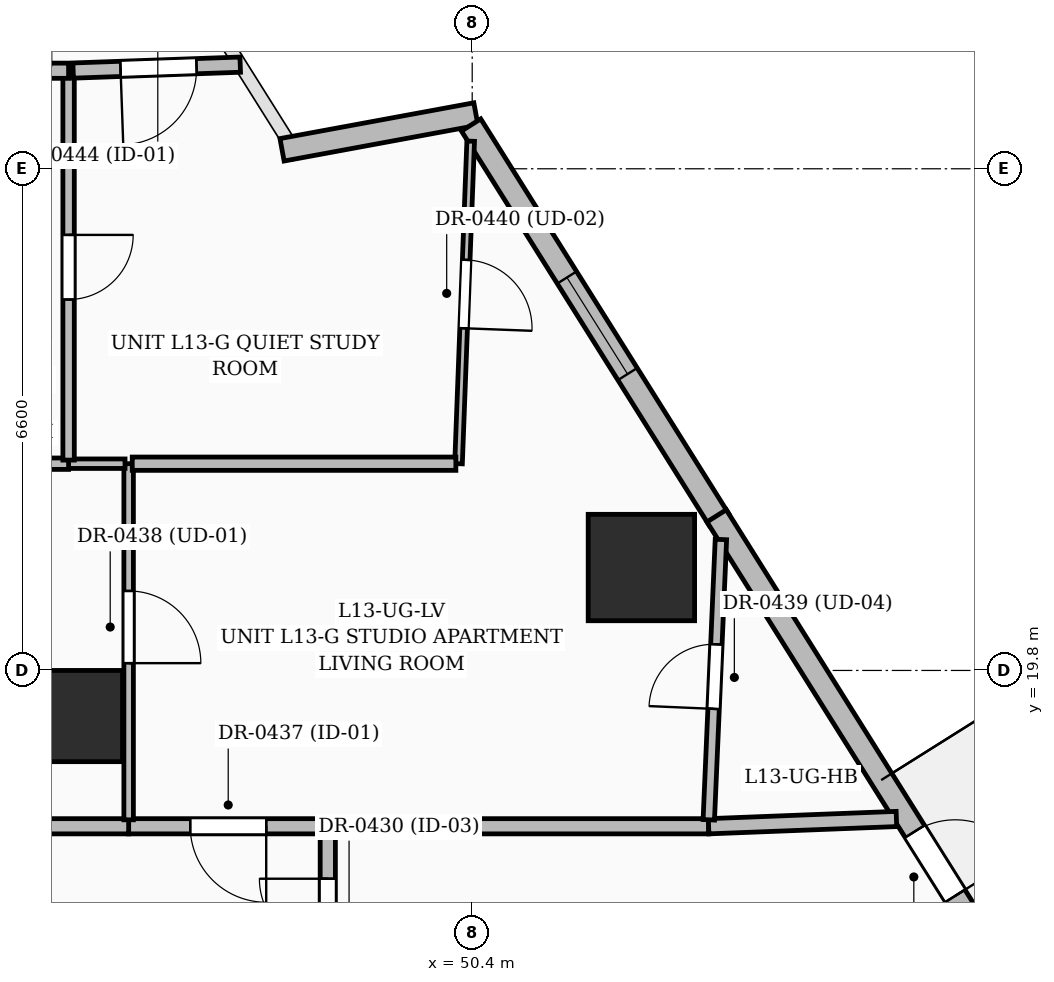
"""IFC4 building model, lengths in metres.
Left out: names, types, materials, properties, quantities, classifications, styles, units other than length and angle.
Written with IfcOpenShell. Run it as: python <this file> out.ifc"""

import sys

from ifc_helpers import new_model, si_unit, direction, frame, frame_2d, origin, origin_2d, place, context, subcontext, project, spatial, rectangle, extrude, element, fill, save


model = new_model("IFC4")
c1 = context("Model", 3, precision=1e-05, world=origin(), true_north=direction((0.0, 1.0)))
c2 = subcontext(c1, "Body", "Model", "MODEL_VIEW")
j1 = project(units=[si_unit("LENGTHUNIT", "METRE"), si_unit("PLANEANGLEUNIT", "RADIAN")], contexts=[c1])
p1 = place(None, origin())
s1 = spatial("IfcSite", under=j1, at=p1, CompositionType="ELEMENT")
p2 = place(p1, origin())
s2 = spatial("IfcBuilding", under=s1, at=p2, CompositionType="ELEMENT")
p3 = place(p2, frame((0.0, 0.0, 57.0)))
s3 = spatial("IfcBuildingStorey", under=s2, at=p3, CompositionType="ELEMENT", Elevation=57.0)
p4 = place(p3, frame((45.2, 19.2, 0.0), z_axis=(0.0, 0.0, 1.0), x_axis=(1.0, 0.0, 0.0)))
e1 = element("IfcColumn", 1, at=p4, inside=s3, PredefinedType="COLUMN", context=c2, shape_type="SweptSolid", body=[
    extrude(rectangle(XDim=1.2, YDim=1.2, at=origin_2d()), origin(), (0.0, 0.0, 1.0), 3.6),
])
p5 = place(p3, frame((52.626, 21.154, 0.0), z_axis=(0.0, 0.0, 1.0), x_axis=(1.0, 0.0, 0.0)))
e2 = element("IfcColumn", 2, at=p5, inside=s3, PredefinedType="COLUMN", context=c2, shape_type="SweptSolid", body=[
    extrude(rectangle(XDim=1.4, YDim=1.4, at=origin_2d()), origin(), (0.0, 0.0, 1.0), 3.6),
])
p6 = place(p3, frame((47.898, 26.65, 0.0), z_axis=(0.0, 0.0, 1.0), x_axis=(0.983393554406, 0.181485859375, 0.0)))
e3 = element("IfcWall", 3, at=p6, inside=s3, PredefinedType="SOLIDWALL", context=c2, shape_type="SweptSolid", body=[
    extrude(rectangle(XDim=2.594, YDim=0.3, at=frame_2d((1.297, 0.0))), origin(), (0.0, 0.0, 1.0), 2.375),
])
p7 = place(p3, frame((50.385, 26.977, 0.0), z_axis=(0.0, 0.0, 1.0), x_axis=(0.531889110823, -0.846814013694, 0.0)))
e4 = element("IfcWall", 4, at=p7, inside=s3, PredefinedType="SOLIDWALL", context=c2, shape_type="SweptSolid", body=[
    extrude(rectangle(XDim=6.126, YDim=0.3, at=frame_2d((3.063, 0.0))), origin(), (0.0, 0.0, 1.0), 3.35),
])
p8 = place(p7, frame((2.37, 0.0, 0.6)))
e5 = element("IfcOpeningElement", 5, at=p8, cuts=e4, PredefinedType="OPENING", context=c2, shape_type="SweptSolid", body=[
    extrude(rectangle(XDim=1.5, YDim=2.1, at=frame_2d((0.75, 1.05))), frame((0.0, 0.16, 0.0), z_axis=(0.0, -1.0, 0.0), x_axis=(1.0, 0.0, 0.0)), (0.0, 0.0, 1.0), 0.32),
])
p9 = place(p3, frame((53.616, 21.834, 0.0), z_axis=(0.0, 0.0, 1.0), x_axis=(0.531897146978, -0.846808966082, 0.0)))
e6 = element("IfcWall", 6, at=p9, inside=s3, PredefinedType="SOLIDWALL", context=c2, shape_type="SweptSolid", body=[
    extrude(rectangle(XDim=6.123, YDim=0.3, at=frame_2d((3.062, 0.0))), origin(), (0.0, 0.0, 1.0), 3.35),
])
p10 = place(p9, frame((4.903, 0.0, 0.0)))
e7 = element("IfcOpeningElement", 7, at=p10, cuts=e6, PredefinedType="OPENING", context=c2, shape_type="SweptSolid", body=[
    extrude(rectangle(XDim=1.0, YDim=2.2, at=frame_2d((0.5, 1.1))), frame((0.0, 0.16, 0.0), z_axis=(0.0, -1.0, 0.0), x_axis=(1.0, 0.0, 0.0)), (0.0, 0.0, 1.0), 0.32),
])
p11 = place(p3, frame((48.5, 15.47, 0.0), z_axis=(0.0, 0.0, 1.0), x_axis=(0.0, 1.0, 0.0)))
e8 = element("IfcWall", 8, at=p11, inside=s3, PredefinedType="PARTITIONING", context=c2, shape_type="SweptSolid", body=[
    extrude(rectangle(XDim=2.28, YDim=0.2, at=frame_2d((1.14, 0.0))), origin(), (0.0, 0.0, 1.0), 2.279),
])
p12 = place(p11, frame((0.69, 0.0, 0.0)))
e9 = element("IfcOpeningElement", 9, at=p12, cuts=e8, PredefinedType="OPENING", context=c2, shape_type="SweptSolid", body=[
    extrude(rectangle(XDim=0.9, YDim=2.1, at=frame_2d((0.45, 1.05))), frame((0.0, 0.11, 0.0), z_axis=(0.0, -1.0, 0.0), x_axis=(1.0, 0.0, 0.0)), (0.0, 0.0, 1.0), 0.22),
])
p13 = place(p3, frame((48.415, 17.75, 0.0), z_axis=(0.0, 0.0, 1.0), x_axis=(-1.0, 0.0, 0.0)))
e10 = element("IfcWall", 10, at=p13, inside=s3, PredefinedType="PARTITIONING", context=c2, shape_type="SweptSolid", body=[
    extrude(rectangle(XDim=2.535, YDim=0.2, at=frame_2d((1.268, 0.0))), origin(), (0.0, 0.0, 1.0), 2.309),
])
p14 = place(p13, frame((0.725, 0.0, 0.0)))
e11 = element("IfcOpeningElement", 11, at=p14, cuts=e10, PredefinedType="OPENING", context=c2, shape_type="SweptSolid", body=[
    extrude(rectangle(XDim=1.0, YDim=2.2, at=frame_2d((0.5, 1.1))), frame((0.0, 0.11, 0.0), z_axis=(0.0, -1.0, 0.0), x_axis=(1.0, 0.0, 0.0)), (0.0, 0.0, 1.0), 0.22),
])
p15 = place(p3, frame((45.88, 17.75, 0.0), z_axis=(0.0, 0.0, 1.0), x_axis=(-1.0, 0.0, 0.0)))
e12 = element("IfcWall", 12, at=p15, inside=s3, PredefinedType="PARTITIONING", context=c2, shape_type="SweptSolid", body=[
    extrude(rectangle(XDim=3.03, YDim=0.2, at=frame_2d((1.515, 0.0))), origin(), (0.0, 0.0, 1.0), 2.309),
])
p16 = place(p3, frame((53.51, 17.75, 0.0), z_axis=(0.0, 0.0, 1.0), x_axis=(-1.0, 0.0, 0.0)))
e13 = element("IfcWall", 13, at=p16, inside=s3, PredefinedType="PARTITIONING", context=c2, shape_type="SweptSolid", body=[
    extrude(rectangle(XDim=4.925, YDim=0.2, at=frame_2d((2.462, 0.0))), origin(), (0.0, 0.0, 1.0), 2.279),
])
p17 = place(p3, frame((55.981, 17.846, 0.0), z_axis=(0.0, 0.0, 1.0), x_axis=(-0.999246960983, -0.038800914501, 0.0)))
e14 = element("IfcWall", 14, at=p17, inside=s3, PredefinedType="PARTITIONING", context=c2, shape_type="SweptSolid", body=[
    extrude(rectangle(XDim=2.473, YDim=0.2, at=frame_2d((1.236, 0.0))), origin(), (0.0, 0.0, 1.0), 2.37),
])
p18 = place(p3, frame((53.513, 17.835, 0.0), z_axis=(0.0, 0.0, 1.0), x_axis=(0.043187524183, 0.999066983618, 0.0)))
e15 = element("IfcWall", 15, at=p18, inside=s3, PredefinedType="PARTITIONING", context=c2, shape_type="SweptSolid", body=[
    extrude(rectangle(XDim=3.691, YDim=0.15, at=frame_2d((1.846, 0.0))), origin(), (0.0, 0.0, 1.0), 2.37),
])
p19 = place(p18, frame((1.461, 0.0, 0.0)))
e16 = element("IfcOpeningElement", 16, at=p19, cuts=e15, PredefinedType="OPENING", context=c2, shape_type="SweptSolid", body=[
    extrude(rectangle(XDim=0.85, YDim=2.1, at=frame_2d((0.425, 1.05))), frame((0.0, 0.085, 0.0), z_axis=(0.0, -1.0, 0.0), x_axis=(1.0, 0.0, 0.0)), (0.0, 0.0, 1.0), 0.17),
])
p20 = place(p3, frame((45.88, 22.52, 0.0), z_axis=(0.0, 0.0, 1.0), x_axis=(0.0, -1.0, 0.0)))
e17 = element("IfcWall", 17, at=p20, inside=s3, PredefinedType="PARTITIONING", context=c2, shape_type="SweptSolid", body=[
    extrude(rectangle(XDim=4.685, YDim=0.125, at=frame_2d((2.343, 0.0))), origin(), (0.0, 0.0, 1.0), 2.279),
])
p21 = place(p20, frame((1.674, 0.0, 0.0)))
e18 = element("IfcOpeningElement", 18, at=p21, cuts=e17, PredefinedType="OPENING", context=c2, shape_type="SweptSolid", body=[
    extrude(rectangle(XDim=0.95, YDim=2.2, at=frame_2d((0.475, 1.1))), frame((0.0, 0.072, 0.0), z_axis=(0.0, -1.0, 0.0), x_axis=(1.0, 0.0, 0.0)), (0.0, 0.0, 1.0), 0.145),
])
p22 = place(p3, frame((50.38, 26.763, 0.0), z_axis=(0.0, 0.0, 1.0), x_axis=(-0.037662425344, -0.999290519177, 0.0)))
e19 = element("IfcWall", 19, at=p22, inside=s3, PredefinedType="PARTITIONING", context=c2, shape_type="SweptSolid", body=[
    extrude(rectangle(XDim=4.246, YDim=0.1, at=frame_2d((2.123, 0.0))), origin(), (0.0, 0.0, 1.0), 2.37),
])
p23 = place(p22, frame((1.562, 0.0, 0.0)))
e20 = element("IfcOpeningElement", 20, at=p23, cuts=e19, PredefinedType="OPENING", context=c2, shape_type="SweptSolid", body=[
    extrude(rectangle(XDim=0.9, YDim=2.15, at=frame_2d((0.45, 1.075))), frame((0.0, 0.06, 0.0), z_axis=(0.0, -1.0, 0.0), x_axis=(1.0, 0.0, 0.0)), (0.0, 0.0, 1.0), 0.12),
])
p24 = place(p3, frame((50.185, 22.52, 0.0), z_axis=(0.0, 0.0, 1.0), x_axis=(-1.0, 0.0, 0.0)))
e21 = element("IfcWall", 21, at=p24, inside=s3, PredefinedType="PARTITIONING", context=c2, shape_type="SweptSolid", body=[
    extrude(rectangle(XDim=4.258, YDim=0.175, at=frame_2d((2.129, 0.0))), origin(), (0.0, 0.0, 1.0), 2.279),
])
p25 = place(p3, frame((45.833, 22.52, 0.0), z_axis=(0.0, 0.0, 1.0), x_axis=(-1.0, 0.0, 0.0)))
e22 = element("IfcWall", 22, at=p25, inside=s3, PredefinedType="PARTITIONING", context=c2, shape_type="SweptSolid", body=[
    extrude(rectangle(XDim=0.742, YDim=0.125, at=frame_2d((0.371, 0.0))), origin(), (0.0, 0.0, 1.0), 3.35),
])
p26 = place(p3, frame((45.09, 22.52, 0.0), z_axis=(0.0, 0.0, 1.0), x_axis=(-1.0, 0.0, 0.0)))
e23 = element("IfcWall", 23, at=p26, inside=s3, PredefinedType="PARTITIONING", context=c2, shape_type="SweptSolid", body=[
    extrude(rectangle(XDim=2.155, YDim=0.15, at=frame_2d((1.078, 0.0))), origin(), (0.0, 0.0, 1.0), 2.309),
])
p27 = place(p3, frame((45.09, 27.69, 0.0), z_axis=(0.0, 0.0, 1.0), x_axis=(0.0, -1.0, 0.0)))
e24 = element("IfcWall", 24, at=p27, inside=s3, PredefinedType="PARTITIONING", context=c2, shape_type="SweptSolid", body=[
    extrude(rectangle(XDim=5.123, YDim=0.15, at=frame_2d((2.561, 0.0))), origin(), (0.0, 0.0, 1.0), 2.709),
])
p28 = place(p27, frame((2.16, 0.0, 0.0)))
e25 = element("IfcOpeningElement", 25, at=p28, cuts=e24, PredefinedType="OPENING", context=c2, shape_type="SweptSolid", body=[
    extrude(rectangle(XDim=0.85, YDim=2.1, at=frame_2d((0.425, 1.05))), frame((0.0, 0.085, 0.0), z_axis=(0.0, -1.0, 0.0), x_axis=(1.0, 0.0, 0.0)), (0.0, 0.0, 1.0), 0.17),
])
p29 = place(p3, frame((47.348, 27.77, 0.0), z_axis=(0.0, 0.0, 1.0), x_axis=(-0.9993728547, -0.035410412157, 0.0)))
e26 = element("IfcWall", 26, at=p29, inside=s3, PredefinedType="PARTITIONING", context=c2, shape_type="SweptSolid", body=[
    extrude(rectangle(XDim=2.199, YDim=0.2, at=frame_2d((1.1, 0.0))), origin(), (0.0, 0.0, 1.0), 2.279),
])
p30 = place(p29, frame((0.575, 0.0, 0.0)))
e27 = element("IfcOpeningElement", 27, at=p30, cuts=e26, PredefinedType="OPENING", context=c2, shape_type="SweptSolid", body=[
    extrude(rectangle(XDim=1.0, YDim=2.2, at=frame_2d((0.5, 1.1))), frame((0.0, 0.11, 0.0), z_axis=(0.0, -1.0, 0.0), x_axis=(1.0, 0.0, 0.0)), (0.0, 0.0, 1.0), 0.22),
])
p31 = place(p3, frame((45.09, 27.69, 0.0), z_axis=(0.0, 0.0, 1.0), x_axis=(-1.0, 0.0, 0.0)))
e28 = element("IfcWall", 28, at=p31, inside=s3, PredefinedType="PARTITIONING", context=c2, shape_type="SweptSolid", body=[
    extrude(rectangle(XDim=0.32, YDim=0.2, at=frame_2d((0.16, 0.0))), origin(), (0.0, 0.0, 1.0), 3.35),
])
p32 = place(p8, origin())
e29 = element("IfcWindow", 29, at=p32, inside=s3, PartitioningType="SINGLE_PANEL", PredefinedType="WINDOW", context=c2, shape_type="SweptSolid", body=[
    extrude(rectangle(XDim=1.5, YDim=2.1, at=frame_2d((0.75, 1.05))), frame((0.0, 0.03, 0.0), z_axis=(0.0, -1.0, 0.0), x_axis=(1.0, 0.0, 0.0)), (0.0, 0.0, 1.0), 0.06),
])
fill(e5, e29)
p33 = place(p10, origin())
e30 = element("IfcDoor", 30, at=p33, inside=s3, OperationType="SINGLE_SWING_RIGHT", PredefinedType="DOOR", context=c2, shape_type="SweptSolid", body=[
    extrude(rectangle(XDim=1.0, YDim=2.2, at=frame_2d((0.5, 1.1))), frame((0.0, 0.025, 0.0), z_axis=(0.0, -1.0, 0.0), x_axis=(1.0, 0.0, 0.0)), (0.0, 0.0, 1.0), 0.05),
])
fill(e7, e30)
p34 = place(p12, origin())
e31 = element("IfcDoor", 31, at=p34, inside=s3, OperationType="SINGLE_SWING_RIGHT", PredefinedType="DOOR", context=c2, shape_type="SweptSolid", body=[
    extrude(rectangle(XDim=0.9, YDim=2.1, at=frame_2d((0.45, 1.05))), frame((0.0, 0.025, 0.0), z_axis=(0.0, -1.0, 0.0), x_axis=(1.0, 0.0, 0.0)), (0.0, 0.0, 1.0), 0.05),
])
fill(e9, e31)
p35 = place(p14, origin())
e32 = element("IfcDoor", 32, at=p35, inside=s3, OperationType="SINGLE_SWING_LEFT", PredefinedType="DOOR", context=c2, shape_type="SweptSolid", body=[
    extrude(rectangle(XDim=1.0, YDim=2.2, at=frame_2d((0.5, 1.1))), frame((0.0, 0.025, 0.0), z_axis=(0.0, -1.0, 0.0), x_axis=(1.0, 0.0, 0.0)), (0.0, 0.0, 1.0), 0.05),
])
fill(e11, e32)
p36 = place(p21, origin())
e33 = element("IfcDoor", 33, at=p36, inside=s3, OperationType="SINGLE_SWING_RIGHT", PredefinedType="DOOR", context=c2, shape_type="SweptSolid", body=[
    extrude(rectangle(XDim=0.95, YDim=2.2, at=frame_2d((0.475, 1.1))), frame((0.0, 0.025, 0.0), z_axis=(0.0, -1.0, 0.0), x_axis=(1.0, 0.0, 0.0)), (0.0, 0.0, 1.0), 0.05),
])
fill(e18, e33)
p37 = place(p19, origin())
e34 = element("IfcDoor", 34, at=p37, inside=s3, OperationType="SINGLE_SWING_LEFT", PredefinedType="DOOR", context=c2, shape_type="SweptSolid", body=[
    extrude(rectangle(XDim=0.85, YDim=2.1, at=frame_2d((0.425, 1.05))), frame((0.0, 0.025, 0.0), z_axis=(0.0, -1.0, 0.0), x_axis=(1.0, 0.0, 0.0)), (0.0, 0.0, 1.0), 0.05),
])
fill(e16, e34)
p38 = place(p23, origin())
e35 = element("IfcDoor", 35, at=p38, inside=s3, OperationType="SINGLE_SWING_RIGHT", PredefinedType="DOOR", context=c2, shape_type="SweptSolid", body=[
    extrude(rectangle(XDim=0.9, YDim=2.15, at=frame_2d((0.45, 1.075))), frame((0.0, 0.025, 0.0), z_axis=(0.0, -1.0, 0.0), x_axis=(1.0, 0.0, 0.0)), (0.0, 0.0, 1.0), 0.05),
])
fill(e20, e35)
p39 = place(p28, origin())
e36 = element("IfcDoor", 36, at=p39, inside=s3, OperationType="SINGLE_SWING_LEFT", PredefinedType="DOOR", context=c2, shape_type="SweptSolid", body=[
    extrude(rectangle(XDim=0.85, YDim=2.1, at=frame_2d((0.425, 1.05))), frame((0.0, 0.025, 0.0), z_axis=(0.0, -1.0, 0.0), x_axis=(1.0, 0.0, 0.0)), (0.0, 0.0, 1.0), 0.05),
])
fill(e25, e36)
p40 = place(p30, origin())
e37 = element("IfcDoor", 37, at=p40, inside=s3, OperationType="SINGLE_SWING_RIGHT", PredefinedType="DOOR", context=c2, shape_type="SweptSolid", body=[
    extrude(rectangle(XDim=1.0, YDim=2.2, at=frame_2d((0.5, 1.1))), frame((0.0, 0.025, 0.0), z_axis=(0.0, -1.0, 0.0), x_axis=(1.0, 0.0, 0.0)), (0.0, 0.0, 1.0), 0.05),
])
fill(e27, e37)
save(model, sys.argv[1])
